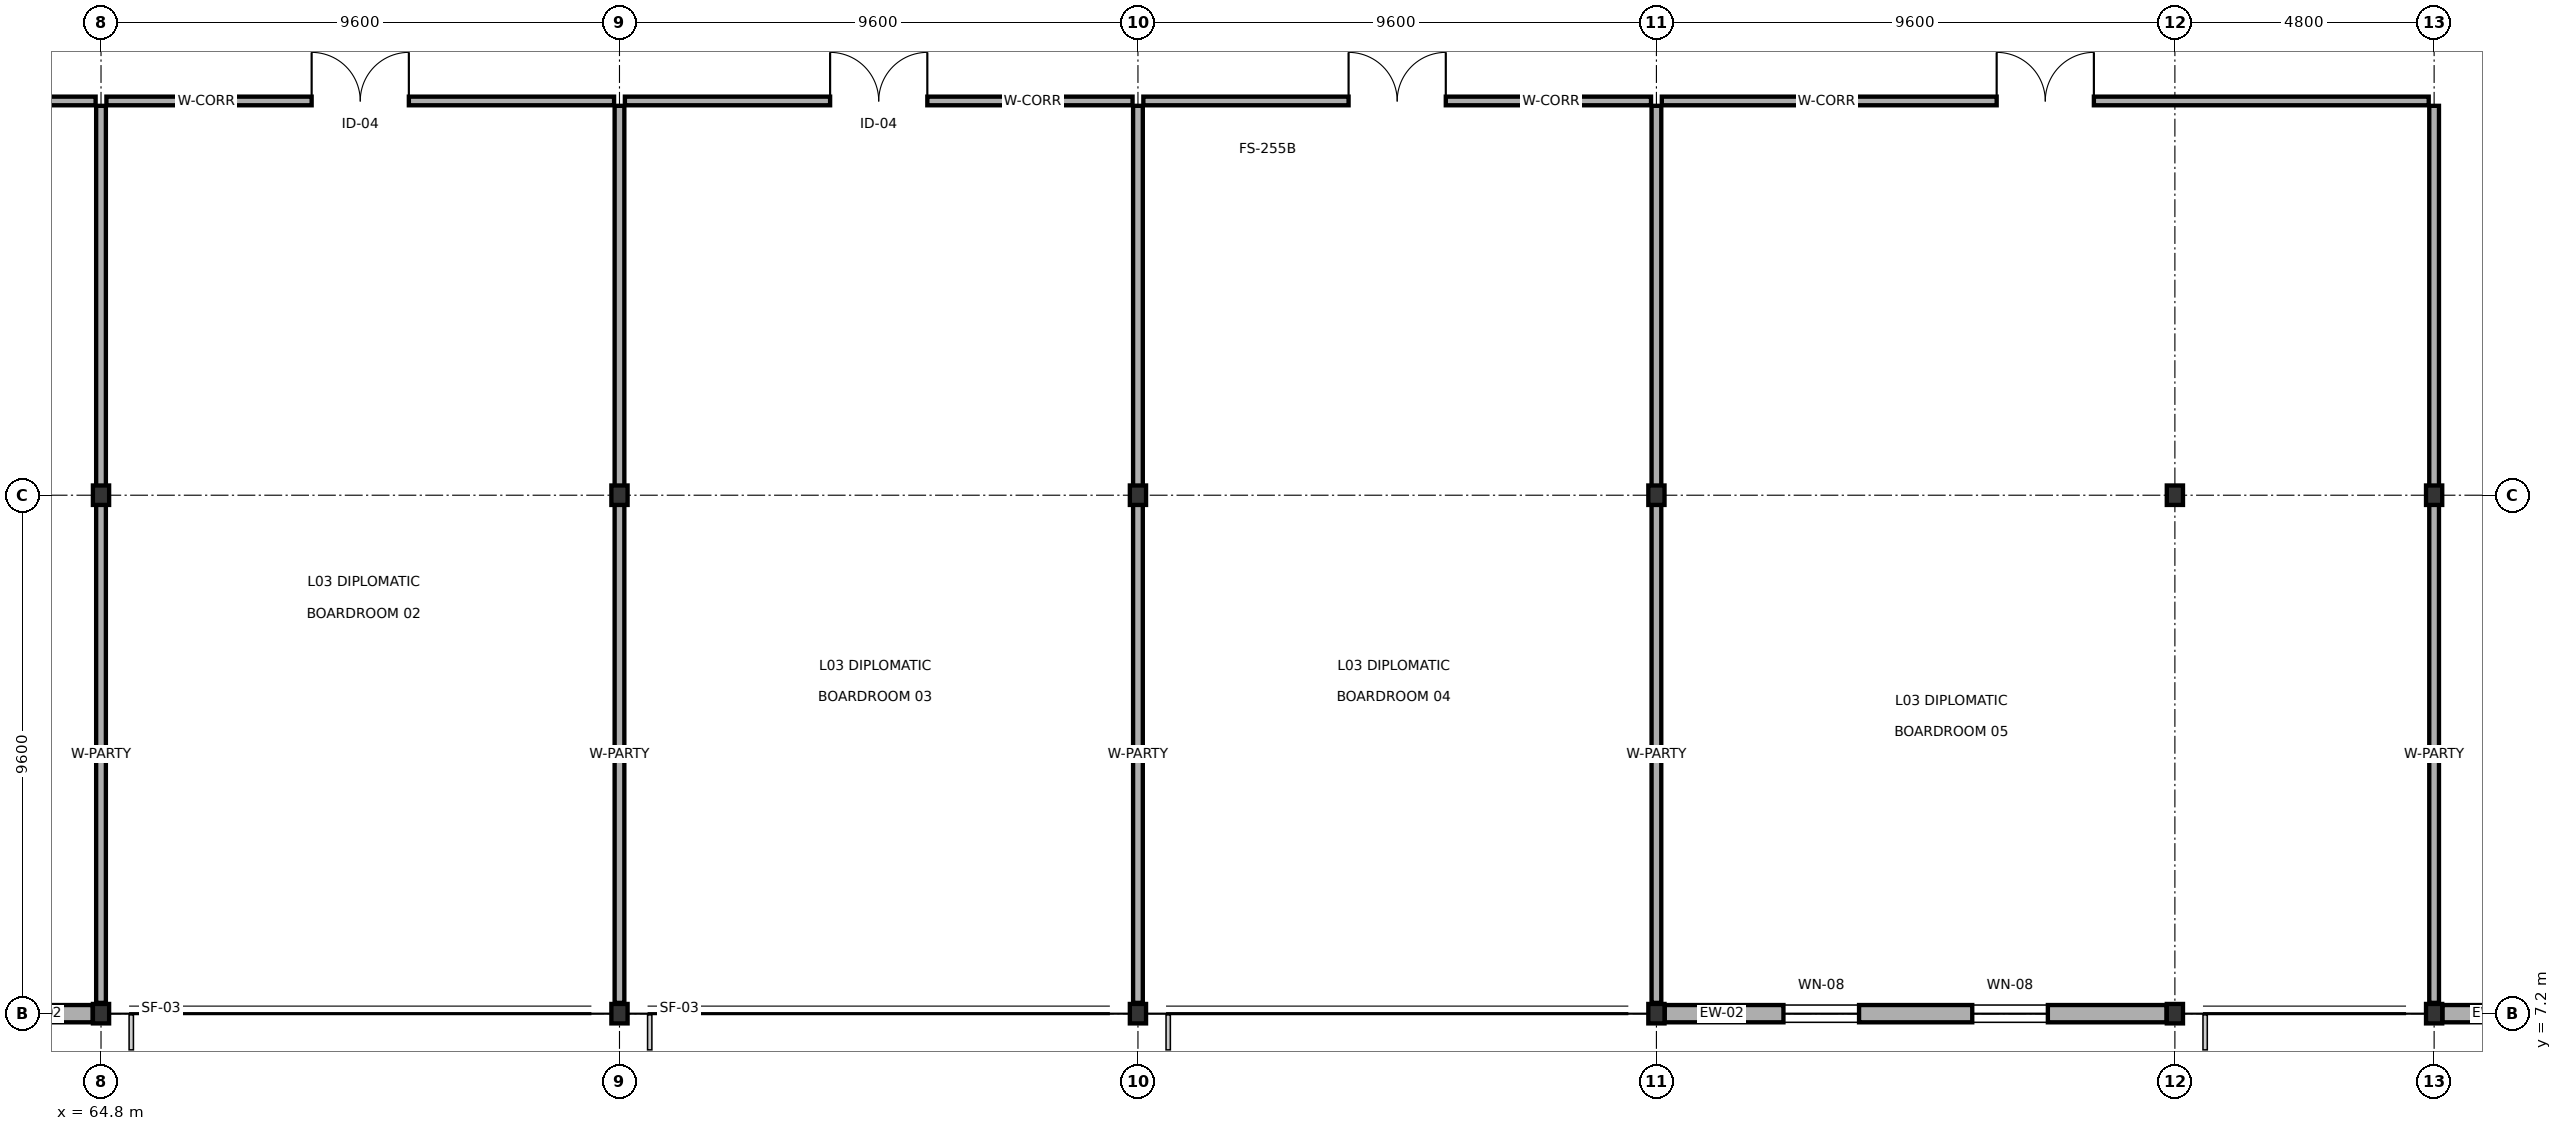
"""IFC4 building model, lengths in metres.
Left out: names, types, materials, properties, quantities, classifications, styles, units other than length and angle.
Written with IfcOpenShell. Run it as: python <this file> out.ifc"""

import sys

from ifc_helpers import new_model, si_unit, direction, frame, frame_2d, origin, origin_2d, place, context, subcontext, project, spatial, rectangle, i_section, extrude, element, fill, save


model = new_model("IFC4")
c1 = context("Model", 3, precision=1e-05, world=origin(), true_north=direction((0.0, 1.0)))
c2 = subcontext(c1, "Body", "Model", "MODEL_VIEW")
j1 = project(units=[si_unit("LENGTHUNIT", "METRE"), si_unit("PLANEANGLEUNIT", "RADIAN")], contexts=[c1])
p1 = place(None, origin())
s1 = spatial("IfcSite", under=j1, at=p1, CompositionType="ELEMENT")
p2 = place(p1, origin())
s2 = spatial("IfcBuilding", under=s1, at=p2, CompositionType="ELEMENT")
p3 = place(p2, frame((0.0, 0.0, 9.9)))
s3 = spatial("IfcBuildingStorey", under=s2, at=p3, CompositionType="ELEMENT", Elevation=9.9)
for number, where, z_axis, x_axis in (
    (1, (64.8, 7.2, 0.0), (0.0, 0.0, 1.0), (1.0, 0.0, 0.0)),
    (2, (64.8, 16.8, 0.0), (0.0, 0.0, 1.0), (1.0, 0.0, 0.0)),
    (3, (74.4, 7.2, 0.0), (0.0, 0.0, 1.0), (1.0, 0.0, 0.0)),
    (4, (74.4, 16.8, 0.0), (0.0, 0.0, 1.0), (1.0, 0.0, 0.0)),
    (5, (84.0, 7.2, 0.0), (0.0, 0.0, 1.0), (1.0, 0.0, 0.0)),
    (6, (84.0, 16.8, 0.0), (0.0, 0.0, 1.0), (1.0, 0.0, 0.0)),
    (7, (93.6, 7.2, 0.0), (0.0, 0.0, 1.0), (1.0, 0.0, 0.0)),
    (8, (93.6, 16.8, 0.0), (0.0, 0.0, 1.0), (1.0, 0.0, 0.0)),
    (9, (103.2, 7.2, 0.0), (0.0, 0.0, 1.0), (1.0, 0.0, 0.0)),
    (10, (103.2, 16.8, 0.0), (0.0, 0.0, 1.0), (1.0, 0.0, 0.0)),
    (11, (108.0, 7.2, 0.0), (0.0, 0.0, 1.0), (1.0, 0.0, 0.0)),
    (12, (108.0, 16.8, 0.0), (0.0, 0.0, 1.0), (1.0, 0.0, 0.0)),
):
    element("IfcColumn", number, at=place(p3, frame(where, z_axis=z_axis, x_axis=x_axis)), inside=s3, PredefinedType="COLUMN", context=c2, shape_type="SweptSolid", body=[
        extrude(i_section(OverallWidth=0.3, OverallDepth=0.36, WebThickness=0.012, FlangeThickness=0.022, FilletRadius=0.027, at=origin_2d()), origin(), (0.0, 0.0, 1.0), 4.8),
    ])
p4 = place(p3, frame((55.354, 7.2, 0.0), z_axis=(0.0, 0.0, 1.0), x_axis=(1.0, 0.0, 0.0)))
e13 = element("IfcWall", 13, at=p4, inside=s3, PredefinedType="SOLIDWALL", context=c2, shape_type="SweptSolid", body=[
    extrude(rectangle(XDim=9.292, YDim=0.32, at=frame_2d((4.646, 0.0))), origin(), (0.0, 0.0, 1.0), 4.025),
])
p5 = place(p4, frame((2.048, 0.0, 0.75)))
e14 = element("IfcOpeningElement", 14, at=p5, cuts=e13, PredefinedType="OPENING", context=c2, shape_type="SweptSolid", body=[
    extrude(rectangle(XDim=1.7, YDim=1.4, at=frame_2d((0.85, 0.7))), frame((0.0, 0.17, 0.0), z_axis=(0.0, -1.0, 0.0), x_axis=(1.0, 0.0, 0.0)), (0.0, 0.0, 1.0), 0.34),
])
p6 = place(p4, frame((5.544, 0.0, 0.75)))
e15 = element("IfcOpeningElement", 15, at=p6, cuts=e13, PredefinedType="OPENING", context=c2, shape_type="SweptSolid", body=[
    extrude(rectangle(XDim=1.7, YDim=1.4, at=frame_2d((0.85, 0.7))), frame((0.0, 0.17, 0.0), z_axis=(0.0, -1.0, 0.0), x_axis=(1.0, 0.0, 0.0)), (0.0, 0.0, 1.0), 0.34),
])
p7 = place(p3, frame((93.754, 7.2, 0.0), z_axis=(0.0, 0.0, 1.0), x_axis=(1.0, 0.0, 0.0)))
e16 = element("IfcWall", 16, at=p7, inside=s3, PredefinedType="SOLIDWALL", context=c2, shape_type="SweptSolid", body=[
    extrude(rectangle(XDim=9.292, YDim=0.32, at=frame_2d((4.646, 0.0))), origin(), (0.0, 0.0, 1.0), 4.025),
])
p8 = place(p7, frame((2.198, 0.0, 0.75)))
e17 = element("IfcOpeningElement", 17, at=p8, cuts=e16, PredefinedType="OPENING", context=c2, shape_type="SweptSolid", body=[
    extrude(rectangle(XDim=1.4, YDim=1.5, at=frame_2d((0.7, 0.75))), frame((0.0, 0.17, 0.0), z_axis=(0.0, -1.0, 0.0), x_axis=(1.0, 0.0, 0.0)), (0.0, 0.0, 1.0), 0.34),
])
p9 = place(p7, frame((5.694, 0.0, 0.75)))
e18 = element("IfcOpeningElement", 18, at=p9, cuts=e16, PredefinedType="OPENING", context=c2, shape_type="SweptSolid", body=[
    extrude(rectangle(XDim=1.4, YDim=1.5, at=frame_2d((0.7, 0.75))), frame((0.0, 0.17, 0.0), z_axis=(0.0, -1.0, 0.0), x_axis=(1.0, 0.0, 0.0)), (0.0, 0.0, 1.0), 0.34),
])
p10 = place(p3, frame((108.154, 7.2, 0.0), z_axis=(0.0, 0.0, 1.0), x_axis=(1.0, 0.0, 0.0)))
e19 = element("IfcWall", 19, at=p10, inside=s3, PredefinedType="SOLIDWALL", context=c2, shape_type="SweptSolid", body=[
    extrude(rectangle(XDim=9.292, YDim=0.32, at=frame_2d((4.646, 0.0))), origin(), (0.0, 0.0, 1.0), 4.025),
])
p11 = place(p10, frame((1.998, 0.0, 0.75)))
e20 = element("IfcOpeningElement", 20, at=p11, cuts=e19, PredefinedType="OPENING", context=c2, shape_type="SweptSolid", body=[
    extrude(rectangle(XDim=1.8, YDim=1.5, at=frame_2d((0.9, 0.75))), frame((0.0, 0.17, 0.0), z_axis=(0.0, -1.0, 0.0), x_axis=(1.0, 0.0, 0.0)), (0.0, 0.0, 1.0), 0.34),
])
p12 = place(p10, frame((5.494, 0.0, 0.75)))
e21 = element("IfcOpeningElement", 21, at=p12, cuts=e19, PredefinedType="OPENING", context=c2, shape_type="SweptSolid", body=[
    extrude(rectangle(XDim=1.8, YDim=1.5, at=frame_2d((0.9, 0.75))), frame((0.0, 0.17, 0.0), z_axis=(0.0, -1.0, 0.0), x_axis=(1.0, 0.0, 0.0)), (0.0, 0.0, 1.0), 0.34),
])
p13 = place(p3, frame((55.3, 24.1, 0.0), z_axis=(0.0, 0.0, 1.0), x_axis=(1.0, 0.0, 0.0)))
e22 = element("IfcWall", 22, at=p13, inside=s3, PredefinedType="PARTITIONING", context=c2, shape_type="SweptSolid", body=[
    extrude(rectangle(XDim=9.4, YDim=0.16, at=frame_2d((4.7, 0.0))), origin(), (0.0, 0.0, 1.0), 4.025),
])
p14 = place(p13, frame((3.8, 0.0, 0.0)))
e23 = element("IfcOpeningElement", 23, at=p14, cuts=e22, PredefinedType="OPENING", context=c2, shape_type="SweptSolid", body=[
    extrude(rectangle(XDim=1.8, YDim=2.3, at=frame_2d((0.9, 1.15))), frame((0.0, 0.09, 0.0), z_axis=(0.0, -1.0, 0.0), x_axis=(1.0, 0.0, 0.0)), (0.0, 0.0, 1.0), 0.18),
])
p15 = place(p3, frame((64.9, 24.1, 0.0), z_axis=(0.0, 0.0, 1.0), x_axis=(1.0, 0.0, 0.0)))
e24 = element("IfcWall", 24, at=p15, inside=s3, PredefinedType="PARTITIONING", context=c2, shape_type="SweptSolid", body=[
    extrude(rectangle(XDim=9.4, YDim=0.16, at=frame_2d((4.7, 0.0))), origin(), (0.0, 0.0, 1.0), 4.025),
])
p16 = place(p15, frame((3.8, 0.0, 0.0)))
e25 = element("IfcOpeningElement", 25, at=p16, cuts=e24, PredefinedType="OPENING", context=c2, shape_type="SweptSolid", body=[
    extrude(rectangle(XDim=1.8, YDim=2.3, at=frame_2d((0.9, 1.15))), frame((0.0, 0.09, 0.0), z_axis=(0.0, -1.0, 0.0), x_axis=(1.0, 0.0, 0.0)), (0.0, 0.0, 1.0), 0.18),
])
p17 = place(p3, frame((64.8, 7.4, 0.0), z_axis=(0.0, 0.0, 1.0), x_axis=(0.0, 1.0, 0.0)))
e26 = element("IfcWall", 26, at=p17, inside=s3, PredefinedType="PARTITIONING", context=c2, shape_type="SweptSolid", body=[
    extrude(rectangle(XDim=16.61, YDim=0.18, at=frame_2d((8.305, 0.0))), origin(), (0.0, 0.0, 1.0), 4.025),
])
p18 = place(p3, frame((74.5, 24.1, 0.0), z_axis=(0.0, 0.0, 1.0), x_axis=(1.0, 0.0, 0.0)))
e27 = element("IfcWall", 27, at=p18, inside=s3, PredefinedType="PARTITIONING", context=c2, shape_type="SweptSolid", body=[
    extrude(rectangle(XDim=9.4, YDim=0.16, at=frame_2d((4.7, 0.0))), origin(), (0.0, 0.0, 1.0), 4.025),
])
p19 = place(p18, frame((3.8, 0.0, 0.0)))
e28 = element("IfcOpeningElement", 28, at=p19, cuts=e27, PredefinedType="OPENING", context=c2, shape_type="SweptSolid", body=[
    extrude(rectangle(XDim=1.8, YDim=2.3, at=frame_2d((0.9, 1.15))), frame((0.0, 0.09, 0.0), z_axis=(0.0, -1.0, 0.0), x_axis=(1.0, 0.0, 0.0)), (0.0, 0.0, 1.0), 0.18),
])
p20 = place(p3, frame((74.4, 7.4, 0.0), z_axis=(0.0, 0.0, 1.0), x_axis=(0.0, 1.0, 0.0)))
e29 = element("IfcWall", 29, at=p20, inside=s3, PredefinedType="PARTITIONING", context=c2, shape_type="SweptSolid", body=[
    extrude(rectangle(XDim=16.61, YDim=0.18, at=frame_2d((8.305, 0.0))), origin(), (0.0, 0.0, 1.0), 4.025),
])
p21 = place(p3, frame((84.1, 24.1, 0.0), z_axis=(0.0, 0.0, 1.0), x_axis=(1.0, 0.0, 0.0)))
e30 = element("IfcWall", 30, at=p21, inside=s3, PredefinedType="PARTITIONING", context=c2, shape_type="SweptSolid", body=[
    extrude(rectangle(XDim=9.4, YDim=0.16, at=frame_2d((4.7, 0.0))), origin(), (0.0, 0.0, 1.0), 4.025),
])
p22 = place(p21, frame((3.8, 0.0, 0.0)))
e31 = element("IfcOpeningElement", 31, at=p22, cuts=e30, PredefinedType="OPENING", context=c2, shape_type="SweptSolid", body=[
    extrude(rectangle(XDim=1.8, YDim=2.3, at=frame_2d((0.9, 1.15))), frame((0.0, 0.09, 0.0), z_axis=(0.0, -1.0, 0.0), x_axis=(1.0, 0.0, 0.0)), (0.0, 0.0, 1.0), 0.18),
])
p23 = place(p3, frame((84.0, 7.4, 0.0), z_axis=(0.0, 0.0, 1.0), x_axis=(0.0, 1.0, 0.0)))
e32 = element("IfcWall", 32, at=p23, inside=s3, PredefinedType="PARTITIONING", context=c2, shape_type="SweptSolid", body=[
    extrude(rectangle(XDim=16.61, YDim=0.18, at=frame_2d((8.305, 0.0))), origin(), (0.0, 0.0, 1.0), 4.025),
])
p24 = place(p3, frame((93.7, 24.1, 0.0), z_axis=(0.0, 0.0, 1.0), x_axis=(1.0, 0.0, 0.0)))
e33 = element("IfcWall", 33, at=p24, inside=s3, PredefinedType="PARTITIONING", context=c2, shape_type="SweptSolid", body=[
    extrude(rectangle(XDim=14.2, YDim=0.16, at=frame_2d((7.1, 0.0))), origin(), (0.0, 0.0, 1.0), 4.025),
])
p25 = place(p24, frame((6.2, 0.0, 0.0)))
e34 = element("IfcOpeningElement", 34, at=p25, cuts=e33, PredefinedType="OPENING", context=c2, shape_type="SweptSolid", body=[
    extrude(rectangle(XDim=1.8, YDim=2.3, at=frame_2d((0.9, 1.15))), frame((0.0, 0.09, 0.0), z_axis=(0.0, -1.0, 0.0), x_axis=(1.0, 0.0, 0.0)), (0.0, 0.0, 1.0), 0.18),
])
for number, where, z_axis, x_axis in (
    (35, (93.6, 7.4, 0.0), (0.0, 0.0, 1.0), (0.0, 1.0, 0.0)),
    (36, (108.0, 7.4, 0.0), (0.0, 0.0, 1.0), (0.0, 1.0, 0.0)),
):
    element("IfcWall", number, at=place(p3, frame(where, z_axis=z_axis, x_axis=x_axis)), inside=s3, PredefinedType="PARTITIONING", context=c2, shape_type="SweptSolid", body=[
        extrude(rectangle(XDim=16.61, YDim=0.18, at=frame_2d((8.305, 0.0))), origin(), (0.0, 0.0, 1.0), 4.025),
    ])
p26 = place(p8, origin())
e37 = element("IfcWindow", 37, at=p26, inside=s3, PartitioningType="SINGLE_PANEL", PredefinedType="WINDOW", context=c2, shape_type="SweptSolid", body=[
    extrude(rectangle(XDim=1.4, YDim=1.5, at=frame_2d((0.7, 0.75))), frame((0.0, 0.03, 0.0), z_axis=(0.0, -1.0, 0.0), x_axis=(1.0, 0.0, 0.0)), (0.0, 0.0, 1.0), 0.06),
])
fill(e17, e37)
p27 = place(p9, origin())
e38 = element("IfcWindow", 38, at=p27, inside=s3, PartitioningType="SINGLE_PANEL", PredefinedType="WINDOW", context=c2, shape_type="SweptSolid", body=[
    extrude(rectangle(XDim=1.4, YDim=1.5, at=frame_2d((0.7, 0.75))), frame((0.0, 0.03, 0.0), z_axis=(0.0, -1.0, 0.0), x_axis=(1.0, 0.0, 0.0)), (0.0, 0.0, 1.0), 0.06),
])
fill(e18, e38)
p28 = place(p16, origin())
e39 = element("IfcDoor", 39, at=p28, inside=s3, OperationType="DOUBLE_DOOR_SINGLE_SWING", PredefinedType="DOOR", context=c2, shape_type="SweptSolid", body=[
    extrude(rectangle(XDim=1.8, YDim=2.3, at=frame_2d((0.9, 1.15))), frame((0.0, 0.025, 0.0), z_axis=(0.0, -1.0, 0.0), x_axis=(1.0, 0.0, 0.0)), (0.0, 0.0, 1.0), 0.05),
])
fill(e25, e39)
p29 = place(p19, origin())
e40 = element("IfcDoor", 40, at=p29, inside=s3, OperationType="DOUBLE_DOOR_SINGLE_SWING", PredefinedType="DOOR", context=c2, shape_type="SweptSolid", body=[
    extrude(rectangle(XDim=1.8, YDim=2.3, at=frame_2d((0.9, 1.15))), frame((0.0, 0.025, 0.0), z_axis=(0.0, -1.0, 0.0), x_axis=(1.0, 0.0, 0.0)), (0.0, 0.0, 1.0), 0.05),
])
fill(e28, e40)
p30 = place(p22, origin())
e41 = element("IfcDoor", 41, at=p30, inside=s3, OperationType="DOUBLE_DOOR_SINGLE_SWING", PredefinedType="DOOR", context=c2, shape_type="SweptSolid", body=[
    extrude(rectangle(XDim=1.8, YDim=2.3, at=frame_2d((0.9, 1.15))), frame((0.0, 0.025, 0.0), z_axis=(0.0, -1.0, 0.0), x_axis=(1.0, 0.0, 0.0)), (0.0, 0.0, 1.0), 0.05),
])
fill(e31, e41)
p31 = place(p25, origin())
e42 = element("IfcDoor", 42, at=p31, inside=s3, OperationType="DOUBLE_DOOR_SINGLE_SWING", PredefinedType="DOOR", context=c2, shape_type="SweptSolid", body=[
    extrude(rectangle(XDim=1.8, YDim=2.3, at=frame_2d((0.9, 1.15))), frame((0.0, 0.025, 0.0), z_axis=(0.0, -1.0, 0.0), x_axis=(1.0, 0.0, 0.0)), (0.0, 0.0, 1.0), 0.05),
])
fill(e34, e42)
save(model, sys.argv[1])
